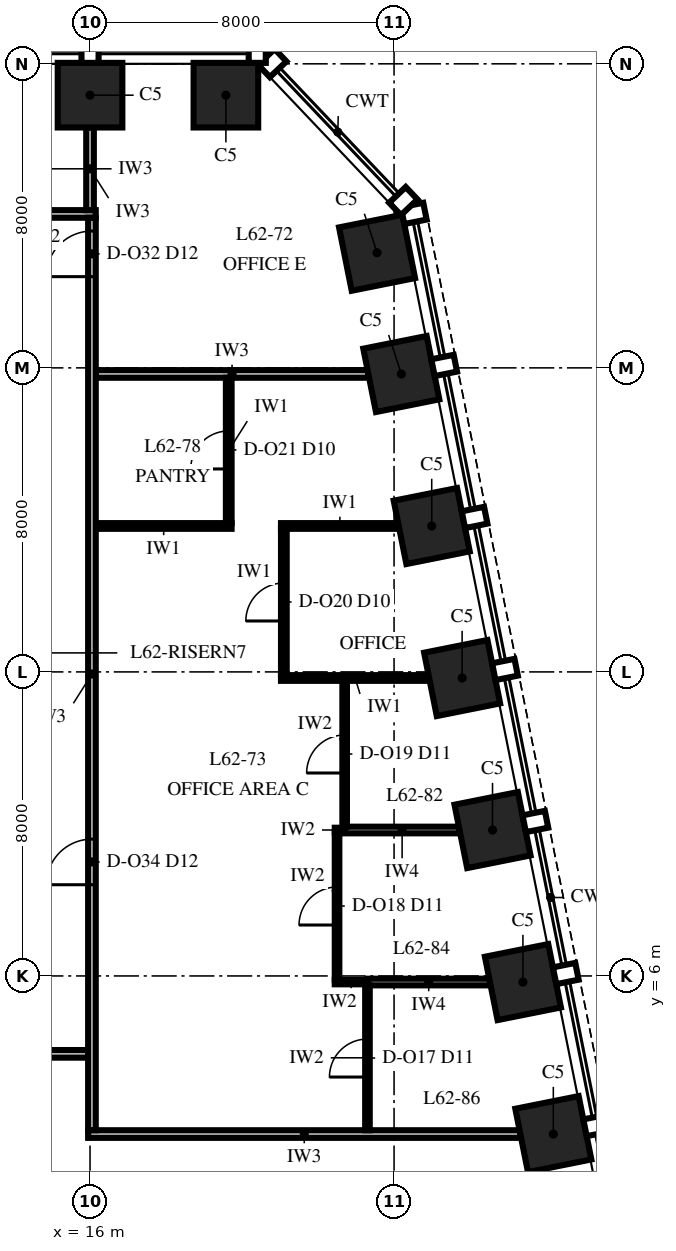
"""IFC4 building model, lengths in metres.
Left out: names, types, materials, properties, quantities, classifications, styles, units other than length and angle.
Written with IfcOpenShell. Run it as: python <this file> out.ifc"""

import sys

from ifc_helpers import new_model, si_unit, direction, frame, frame_2d, origin, origin_2d, place, context, subcontext, project, spatial, rectangle, extrude, element, fill, save


model = new_model("IFC4")
c1 = context("Model", 3, precision=1e-05, world=origin(), true_north=direction((0.0, 1.0)))
c2 = subcontext(c1, "Body", "Model", "MODEL_VIEW")
j1 = project(units=[si_unit("LENGTHUNIT", "METRE"), si_unit("PLANEANGLEUNIT", "RADIAN")], contexts=[c1])
p1 = place(None, origin())
s1 = spatial("IfcSite", under=j1, at=p1, CompositionType="ELEMENT")
p2 = place(p1, origin())
s2 = spatial("IfcBuilding", under=s1, at=p2, CompositionType="ELEMENT")
p3 = place(p2, frame((0.0, 0.0, 268.0)))
s3 = spatial("IfcBuildingStorey", under=s2, at=p3, CompositionType="ELEMENT", Elevation=268.0)
for number, where, z_axis, x_axis in (
    (1, (28.191, 1.838, 0.0), (0.0, 0.0, 1.0), (-0.196, 0.981, 0.0)),
    (2, (27.391, 5.838, 0.0), (0.0, 0.0, 1.0), (-0.196, 0.981, 0.0)),
    (3, (26.591, 9.838, 0.0), (0.0, 0.0, 1.0), (-0.196, 0.981, 0.0)),
    (4, (25.791, 13.838, 0.0), (0.0, 0.0, 1.0), (-0.196, 0.981, 0.0)),
    (5, (24.991, 17.838, 0.0), (0.0, 0.0, 1.0), (-0.196, 0.981, 0.0)),
    (6, (24.191, 21.838, 0.0), (0.0, 0.0, 1.0), (-0.196, 0.981, 0.0)),
    (7, (23.553, 25.029, 0.0), (0.0, 0.0, 1.0), (-0.196, 0.981, 0.0)),
    (8, (19.575, 29.175, 0.0), (0.0, 0.0, 1.0), (-1.0, 0.0, 0.0)),
    (9, (16.0, 29.175, 0.0), (0.0, 0.0, 1.0), (-1.0, 0.0, 0.0)),
):
    element("IfcColumn", number, at=place(p3, frame(where, z_axis=z_axis, x_axis=x_axis)), inside=s3, PredefinedType="COLUMN", context=c2, shape_type="SweptSolid", body=[
        extrude(rectangle(XDim=1.7, YDim=1.7, at=origin_2d()), origin(), (0.0, 0.0, 1.0), 4.0),
    ])
p4 = place(p3, frame((15.95, 1.84, 0.0), z_axis=(0.0, 0.0, 1.0), x_axis=(1.0, 0.0, 0.0)))
e10 = element("IfcWall", 10, at=p4, inside=s3, PredefinedType="PARTITIONING", context=c2, shape_type="SweptSolid", body=[
    extrude(rectangle(XDim=11.374, YDim=0.2, at=frame_2d((5.687, 0.0))), origin(), (0.0, 0.0, 1.0), 3.23),
])
p5 = place(p3, frame((-15.95, 3.95, 0.0), z_axis=(0.0, 0.0, 1.0), x_axis=(1.0, 0.0, 0.0)))
e11 = element("IfcWall", 11, at=p5, inside=s3, PredefinedType="PARTITIONING", context=c2, shape_type="SweptSolid", body=[
    extrude(rectangle(XDim=31.9, YDim=0.2, at=frame_2d((15.95, 0.0))), origin(), (0.0, 0.0, 1.0), 3.23),
])
p6 = place(p5, frame((7.35, 0.0, 0.0)))
e12 = element("IfcOpeningElement", 12, at=p6, cuts=e11, PredefinedType="OPENING", context=c2, shape_type="SweptSolid", body=[
    extrude(rectangle(XDim=1.2, YDim=2.4, at=frame_2d((0.6, 1.2))), frame((0.0, 0.115, 0.0), z_axis=(0.0, -1.0, 0.0), x_axis=(1.0, 0.0, 0.0)), (0.0, 0.0, 1.0), 0.23),
])
p7 = place(p5, frame((23.35, 0.0, 0.0)))
e13 = element("IfcOpeningElement", 13, at=p7, cuts=e11, PredefinedType="OPENING", context=c2, shape_type="SweptSolid", body=[
    extrude(rectangle(XDim=1.2, YDim=2.4, at=frame_2d((0.6, 1.2))), frame((0.0, 0.115, 0.0), z_axis=(0.0, -1.0, 0.0), x_axis=(1.0, 0.0, 0.0)), (0.0, 0.0, 1.0), 0.23),
])
p8 = place(p3, frame((22.44, 5.84, 0.0), z_axis=(0.0, 0.0, 1.0), x_axis=(1.0, 0.0, 0.0)))
e14 = element("IfcWall", 14, at=p8, inside=s3, PredefinedType="PARTITIONING", context=c2, shape_type="SweptSolid", body=[
    extrude(rectangle(XDim=0.86, YDim=0.12, at=frame_2d((0.43, 0.0))), origin(), (0.0, 0.0, 1.0), 2.842),
])
p9 = place(p3, frame((23.3, 5.84, 0.0), z_axis=(0.0, 0.0, 1.0), x_axis=(1.0, 0.0, 0.0)))
e15 = element("IfcWall", 15, at=p9, inside=s3, PredefinedType="PARTITIONING", context=c2, shape_type="SweptSolid", body=[
    extrude(rectangle(XDim=3.224, YDim=0.175, at=frame_2d((1.612, 0.0))), origin(), (0.0, 0.0, 1.0), 2.842),
])
p10 = place(p3, frame((22.44, 9.84, 0.0), z_axis=(0.0, 0.0, 1.0), x_axis=(1.0, 0.0, 0.0)))
e16 = element("IfcWall", 16, at=p10, inside=s3, PredefinedType="PARTITIONING", context=c2, shape_type="SweptSolid", body=[
    extrude(rectangle(XDim=0.26, YDim=0.12, at=frame_2d((0.13, 0.0))), origin(), (0.0, 0.0, 1.0), 3.85),
])
p11 = place(p3, frame((22.7, 9.84, 0.0), z_axis=(0.0, 0.0, 1.0), x_axis=(1.0, 0.0, 0.0)))
e17 = element("IfcWall", 17, at=p11, inside=s3, PredefinedType="PARTITIONING", context=c2, shape_type="SweptSolid", body=[
    extrude(rectangle(XDim=3.024, YDim=0.175, at=frame_2d((1.512, 0.0))), origin(), (0.0, 0.0, 1.0), 3.23),
])
p12 = place(p3, frame((21.025, 13.84, 0.0), z_axis=(0.0, 0.0, 1.0), x_axis=(1.0, 0.0, 0.0)))
e18 = element("IfcWall", 18, at=p12, inside=s3, PredefinedType="PARTITIONING", context=c2, shape_type="SweptSolid", body=[
    extrude(rectangle(XDim=3.899, YDim=0.15, at=frame_2d((1.949, 0.0))), origin(), (0.0, 0.0, 1.0), 3.23),
])
p13 = place(p3, frame((16.15, 17.84, 0.0), z_axis=(0.0, 0.0, 1.0), x_axis=(1.0, 0.0, 0.0)))
e19 = element("IfcWall", 19, at=p13, inside=s3, PredefinedType="PARTITIONING", context=c2, shape_type="SweptSolid", body=[
    extrude(rectangle(XDim=3.575, YDim=0.15, at=frame_2d((1.788, 0.0))), origin(), (0.0, 0.0, 1.0), 3.23),
])
p14 = place(p3, frame((21.025, 17.84, 0.0), z_axis=(0.0, 0.0, 1.0), x_axis=(1.0, 0.0, 0.0)))
e20 = element("IfcWall", 20, at=p14, inside=s3, PredefinedType="PARTITIONING", context=c2, shape_type="SweptSolid", body=[
    extrude(rectangle(XDim=3.099, YDim=0.15, at=frame_2d((1.549, 0.0))), origin(), (0.0, 0.0, 1.0), 3.23),
])
p15 = place(p3, frame((16.15, 21.84, 0.0), z_axis=(0.0, 0.0, 1.0), x_axis=(1.0, 0.0, 0.0)))
e21 = element("IfcWall", 21, at=p15, inside=s3, PredefinedType="PARTITIONING", context=c2, shape_type="SweptSolid", body=[
    extrude(rectangle(XDim=7.174, YDim=0.2, at=frame_2d((3.587, 0.0))), origin(), (0.0, 0.0, 1.0), 3.23),
])
p16 = place(p3, frame((-16.15, 26.05, 0.0), z_axis=(0.0, 0.0, 1.0), x_axis=(1.0, 0.0, 0.0)))
e22 = element("IfcWall", 22, at=p16, inside=s3, PredefinedType="PARTITIONING", context=c2, shape_type="SweptSolid", body=[
    extrude(rectangle(XDim=32.3, YDim=0.2, at=frame_2d((16.15, 0.0))), origin(), (0.0, 0.0, 1.0), 3.418),
])
p17 = place(p16, frame((1.55, 0.0, 0.0)))
e23 = element("IfcOpeningElement", 23, at=p17, cuts=e22, PredefinedType="OPENING", context=c2, shape_type="SweptSolid", body=[
    extrude(rectangle(XDim=1.2, YDim=2.4, at=frame_2d((0.6, 1.2))), frame((0.0, 0.115, 0.0), z_axis=(0.0, -1.0, 0.0), x_axis=(1.0, 0.0, 0.0)), (0.0, 0.0, 1.0), 0.23),
])
p18 = place(p16, frame((5.55, 0.0, 0.0)))
e24 = element("IfcOpeningElement", 24, at=p18, cuts=e22, PredefinedType="OPENING", context=c2, shape_type="SweptSolid", body=[
    extrude(rectangle(XDim=1.2, YDim=2.4, at=frame_2d((0.6, 1.2))), frame((0.0, 0.115, 0.0), z_axis=(0.0, -1.0, 0.0), x_axis=(1.0, 0.0, 0.0)), (0.0, 0.0, 1.0), 0.23),
])
p19 = place(p16, frame((9.55, 0.0, 0.0)))
e25 = element("IfcOpeningElement", 25, at=p19, cuts=e22, PredefinedType="OPENING", context=c2, shape_type="SweptSolid", body=[
    extrude(rectangle(XDim=1.2, YDim=2.4, at=frame_2d((0.6, 1.2))), frame((0.0, 0.115, 0.0), z_axis=(0.0, -1.0, 0.0), x_axis=(1.0, 0.0, 0.0)), (0.0, 0.0, 1.0), 0.23),
])
p20 = place(p16, frame((15.55, 0.0, 0.0)))
e26 = element("IfcOpeningElement", 26, at=p20, cuts=e22, PredefinedType="OPENING", context=c2, shape_type="SweptSolid", body=[
    extrude(rectangle(XDim=1.2, YDim=2.4, at=frame_2d((0.6, 1.2))), frame((0.0, 0.115, 0.0), z_axis=(0.0, -1.0, 0.0), x_axis=(1.0, 0.0, 0.0)), (0.0, 0.0, 1.0), 0.23),
])
p21 = place(p16, frame((21.55, 0.0, 0.0)))
e27 = element("IfcOpeningElement", 27, at=p21, cuts=e22, PredefinedType="OPENING", context=c2, shape_type="SweptSolid", body=[
    extrude(rectangle(XDim=1.2, YDim=2.4, at=frame_2d((0.6, 1.2))), frame((0.0, 0.115, 0.0), z_axis=(0.0, -1.0, 0.0), x_axis=(1.0, 0.0, 0.0)), (0.0, 0.0, 1.0), 0.23),
])
p22 = place(p16, frame((25.55, 0.0, 0.0)))
e28 = element("IfcOpeningElement", 28, at=p22, cuts=e22, PredefinedType="OPENING", context=c2, shape_type="SweptSolid", body=[
    extrude(rectangle(XDim=1.2, YDim=2.4, at=frame_2d((0.6, 1.2))), frame((0.0, 0.115, 0.0), z_axis=(0.0, -1.0, 0.0), x_axis=(1.0, 0.0, 0.0)), (0.0, 0.0, 1.0), 0.23),
])
p23 = place(p16, frame((29.55, 0.0, 0.0)))
e29 = element("IfcOpeningElement", 29, at=p23, cuts=e22, PredefinedType="OPENING", context=c2, shape_type="SweptSolid", body=[
    extrude(rectangle(XDim=1.2, YDim=2.4, at=frame_2d((0.6, 1.2))), frame((0.0, 0.115, 0.0), z_axis=(0.0, -1.0, 0.0), x_axis=(1.0, 0.0, 0.0)), (0.0, 0.0, 1.0), 0.23),
])
p24 = place(p3, frame((16.0, 26.15, 0.0), z_axis=(0.0, 0.0, 1.0), x_axis=(0.0, 1.0, 0.0)))
e30 = element("IfcWall", 30, at=p24, inside=s3, PredefinedType="PARTITIONING", context=c2, shape_type="SweptSolid", body=[
    extrude(rectangle(XDim=2.175, YDim=0.2, at=frame_2d((1.087, 0.0))), origin(), (0.0, 0.0, 1.0), 3.418),
])
p25 = place(p3, frame((16.05, 1.94, 0.0), z_axis=(0.0, 0.0, 1.0), x_axis=(0.0, 1.0, 0.0)))
e31 = element("IfcWall", 31, at=p25, inside=s3, PredefinedType="PARTITIONING", context=c2, shape_type="SweptSolid", body=[
    extrude(rectangle(XDim=24.01, YDim=0.2, at=frame_2d((12.005, 0.0))), origin(), (0.0, 0.0, 1.0), 2.842),
])
p26 = place(p25, frame((22.46, 0.0, 0.0)))
e32 = element("IfcOpeningElement", 32, at=p26, cuts=e31, PredefinedType="OPENING", context=c2, shape_type="SweptSolid", body=[
    extrude(rectangle(XDim=1.2, YDim=2.4, at=frame_2d((0.6, 1.2))), frame((0.0, 0.115, 0.0), z_axis=(0.0, -1.0, 0.0), x_axis=(1.0, 0.0, 0.0)), (0.0, 0.0, 1.0), 0.23),
])
p27 = place(p25, frame((6.46, 0.0, 0.0)))
e33 = element("IfcOpeningElement", 33, at=p27, cuts=e31, PredefinedType="OPENING", context=c2, shape_type="SweptSolid", body=[
    extrude(rectangle(XDim=1.2, YDim=2.4, at=frame_2d((0.6, 1.2))), frame((0.0, 0.115, 0.0), z_axis=(0.0, -1.0, 0.0), x_axis=(1.0, 0.0, 0.0)), (0.0, 0.0, 1.0), 0.23),
])
p28 = place(p3, frame((19.65, 17.915, 0.0), z_axis=(0.0, 0.0, 1.0), x_axis=(0.0, 1.0, 0.0)))
e34 = element("IfcWall", 34, at=p28, inside=s3, PredefinedType="PARTITIONING", context=c2, shape_type="SweptSolid", body=[
    extrude(rectangle(XDim=3.825, YDim=0.15, at=frame_2d((1.913, 0.0))), origin(), (0.0, 0.0, 1.0), 3.23),
])
p29 = place(p28, frame((1.425, 0.0, 0.0)))
e35 = element("IfcOpeningElement", 35, at=p29, cuts=e34, PredefinedType="OPENING", context=c2, shape_type="SweptSolid", body=[
    extrude(rectangle(XDim=1.0, YDim=2.3, at=frame_2d((0.5, 1.15))), frame((0.0, 0.09, 0.0), z_axis=(0.0, -1.0, 0.0), x_axis=(1.0, 0.0, 0.0)), (0.0, 0.0, 1.0), 0.18),
])
p30 = place(p3, frame((21.1, 13.915, 0.0), z_axis=(0.0, 0.0, 1.0), x_axis=(0.0, 1.0, 0.0)))
e36 = element("IfcWall", 36, at=p30, inside=s3, PredefinedType="PARTITIONING", context=c2, shape_type="SweptSolid", body=[
    extrude(rectangle(XDim=3.85, YDim=0.15, at=frame_2d((1.925, 0.0))), origin(), (0.0, 0.0, 1.0), 3.23),
])
p31 = place(p30, frame((1.425, 0.0, 0.0)))
e37 = element("IfcOpeningElement", 37, at=p31, cuts=e36, PredefinedType="OPENING", context=c2, shape_type="SweptSolid", body=[
    extrude(rectangle(XDim=1.0, YDim=2.3, at=frame_2d((0.5, 1.15))), frame((0.0, 0.09, 0.0), z_axis=(0.0, -1.0, 0.0), x_axis=(1.0, 0.0, 0.0)), (0.0, 0.0, 1.0), 0.18),
])
p32 = place(p3, frame((22.5, 5.9, 0.0), z_axis=(0.0, 0.0, 1.0), x_axis=(0.0, 1.0, 0.0)))
e38 = element("IfcWall", 38, at=p32, inside=s3, PredefinedType="PARTITIONING", context=c2, shape_type="SweptSolid", body=[
    extrude(rectangle(XDim=3.88, YDim=0.12, at=frame_2d((1.94, 0.0))), origin(), (0.0, 0.0, 1.0), 2.842),
])
p33 = place(p32, frame((1.44, 0.0, 0.0)))
e39 = element("IfcOpeningElement", 39, at=p33, cuts=e38, PredefinedType="OPENING", context=c2, shape_type="SweptSolid", body=[
    extrude(rectangle(XDim=1.0, YDim=2.4, at=frame_2d((0.5, 1.2))), frame((0.0, 0.075, 0.0), z_axis=(0.0, -1.0, 0.0), x_axis=(1.0, 0.0, 0.0)), (0.0, 0.0, 1.0), 0.15),
])
p34 = place(p3, frame((22.7, 9.927, 0.0), z_axis=(0.0, 0.0, 1.0), x_axis=(0.0, 1.0, 0.0)))
e40 = element("IfcWall", 40, at=p34, inside=s3, PredefinedType="PARTITIONING", context=c2, shape_type="SweptSolid", body=[
    extrude(rectangle(XDim=3.837, YDim=0.12, at=frame_2d((1.919, 0.0))), origin(), (0.0, 0.0, 1.0), 3.85),
])
p35 = place(p34, frame((1.413, 0.0, 0.0)))
e41 = element("IfcOpeningElement", 41, at=p35, cuts=e40, PredefinedType="OPENING", context=c2, shape_type="SweptSolid", body=[
    extrude(rectangle(XDim=1.0, YDim=2.4, at=frame_2d((0.5, 1.2))), frame((0.0, 0.075, 0.0), z_axis=(0.0, -1.0, 0.0), x_axis=(1.0, 0.0, 0.0)), (0.0, 0.0, 1.0), 0.15),
])
p36 = place(p3, frame((23.3, 1.94, 0.0), z_axis=(0.0, 0.0, 1.0), x_axis=(0.0, 1.0, 0.0)))
e42 = element("IfcWall", 42, at=p36, inside=s3, PredefinedType="PARTITIONING", context=c2, shape_type="SweptSolid", body=[
    extrude(rectangle(XDim=3.812, YDim=0.12, at=frame_2d((1.906, 0.0))), origin(), (0.0, 0.0, 1.0), 3.85),
])
p37 = place(p36, frame((1.4, 0.0, 0.0)))
e43 = element("IfcOpeningElement", 43, at=p37, cuts=e42, PredefinedType="OPENING", context=c2, shape_type="SweptSolid", body=[
    extrude(rectangle(XDim=1.0, YDim=2.4, at=frame_2d((0.5, 1.2))), frame((0.0, 0.075, 0.0), z_axis=(0.0, -1.0, 0.0), x_axis=(1.0, 0.0, 0.0)), (0.0, 0.0, 1.0), 0.15),
])
p38 = place(p37, origin())
e44 = element("IfcDoor", 44, at=p38, inside=s3, OperationType="SINGLE_SWING_RIGHT", PredefinedType="DOOR", context=c2, shape_type="SweptSolid", body=[
    extrude(rectangle(XDim=1.0, YDim=2.4, at=frame_2d((0.5, 1.2))), frame((0.0, 0.06, 0.0), z_axis=(0.0, -1.0, 0.0), x_axis=(1.0, 0.0, 0.0)), (0.0, 0.0, 1.0), 0.12),
])
fill(e43, e44)
p39 = place(p33, origin())
e45 = element("IfcDoor", 45, at=p39, inside=s3, OperationType="SINGLE_SWING_RIGHT", PredefinedType="DOOR", context=c2, shape_type="SweptSolid", body=[
    extrude(rectangle(XDim=1.0, YDim=2.4, at=frame_2d((0.5, 1.2))), frame((0.0, 0.06, 0.0), z_axis=(0.0, -1.0, 0.0), x_axis=(1.0, 0.0, 0.0)), (0.0, 0.0, 1.0), 0.12),
])
fill(e39, e45)
p40 = place(p35, origin())
e46 = element("IfcDoor", 46, at=p40, inside=s3, OperationType="SINGLE_SWING_RIGHT", PredefinedType="DOOR", context=c2, shape_type="SweptSolid", body=[
    extrude(rectangle(XDim=1.0, YDim=2.4, at=frame_2d((0.5, 1.2))), frame((0.0, 0.06, 0.0), z_axis=(0.0, -1.0, 0.0), x_axis=(1.0, 0.0, 0.0)), (0.0, 0.0, 1.0), 0.12),
])
fill(e41, e46)
p41 = place(p31, origin())
e47 = element("IfcDoor", 47, at=p41, inside=s3, OperationType="SINGLE_SWING_LEFT", PredefinedType="DOOR", context=c2, shape_type="SweptSolid", body=[
    extrude(rectangle(XDim=1.0, YDim=2.3, at=frame_2d((0.5, 1.15))), frame((0.0, 0.075, 0.0), z_axis=(0.0, -1.0, 0.0), x_axis=(1.0, 0.0, 0.0)), (0.0, 0.0, 1.0), 0.149),
])
fill(e37, e47)
p42 = place(p29, origin())
e48 = element("IfcDoor", 48, at=p42, inside=s3, OperationType="SINGLE_SWING_LEFT", PredefinedType="DOOR", context=c2, shape_type="SweptSolid", body=[
    extrude(rectangle(XDim=1.0, YDim=2.3, at=frame_2d((0.5, 1.15))), frame((0.0, 0.075, 0.0), z_axis=(0.0, -1.0, 0.0), x_axis=(1.0, 0.0, 0.0)), (0.0, 0.0, 1.0), 0.149),
])
fill(e35, e48)
p43 = place(p26, origin())
e49 = element("IfcDoor", 49, at=p43, inside=s3, OperationType="SINGLE_SWING_LEFT", PredefinedType="DOOR", context=c2, shape_type="SweptSolid", body=[
    extrude(rectangle(XDim=1.2, YDim=2.4, at=frame_2d((0.6, 1.2))), frame((0.0, 0.1, 0.0), z_axis=(0.0, -1.0, 0.0), x_axis=(1.0, 0.0, 0.0)), (0.0, 0.0, 1.0), 0.199),
])
fill(e32, e49)
p44 = place(p27, origin())
e50 = element("IfcDoor", 50, at=p44, inside=s3, OperationType="SINGLE_SWING_LEFT", PredefinedType="DOOR", context=c2, shape_type="SweptSolid", body=[
    extrude(rectangle(XDim=1.2, YDim=2.4, at=frame_2d((0.6, 1.2))), frame((0.0, 0.1, 0.0), z_axis=(0.0, -1.0, 0.0), x_axis=(1.0, 0.0, 0.0)), (0.0, 0.0, 1.0), 0.199),
])
fill(e33, e50)
save(model, sys.argv[1])
